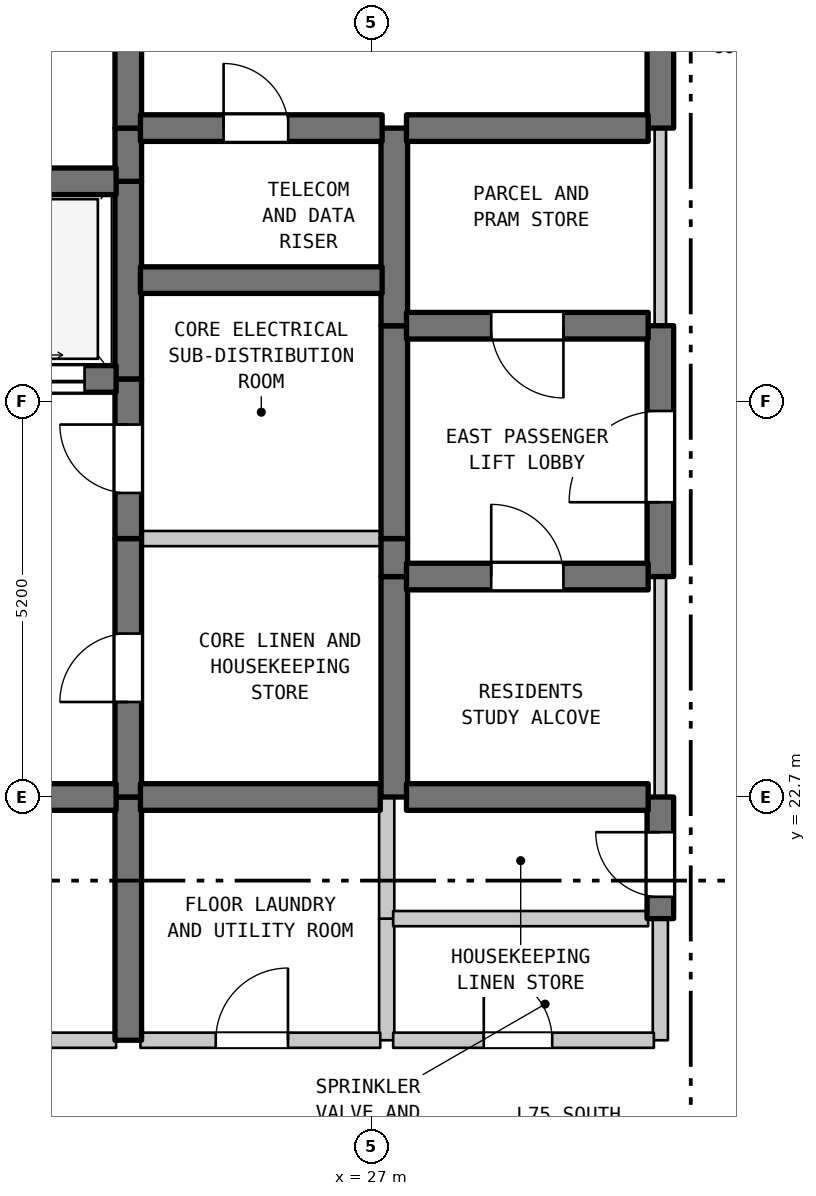
"""IFC4 building model, lengths in metres.
Left out: names, types, materials, properties, quantities, classifications, styles, units other than length and angle.
Written with IfcOpenShell. Run it as: python <this file> out.ifc"""

import sys

from ifc_helpers import new_model, si_unit, direction, frame, frame_2d, origin, place, context, subcontext, project, spatial, rectangle, extrude, element, fill, save


model = new_model("IFC4")
c1 = context("Model", 3, precision=1e-05, world=origin(), true_north=direction((0.0, 1.0)))
c2 = subcontext(c1, "Body", "Model", "MODEL_VIEW")
j1 = project(units=[si_unit("LENGTHUNIT", "METRE"), si_unit("PLANEANGLEUNIT", "RADIAN")], contexts=[c1])
p1 = place(None, origin())
s1 = spatial("IfcSite", under=j1, at=p1, CompositionType="ELEMENT")
p2 = place(p1, origin())
s2 = spatial("IfcBuilding", under=s1, at=p2, CompositionType="ELEMENT")
p3 = place(p2, frame((0.0, 0.0, 299.1)))
s3 = spatial("IfcBuildingStorey", under=s2, at=p3, CompositionType="ELEMENT", Elevation=299.1)
p4 = place(p3, frame((23.8, 19.5, 0.0), z_axis=(0.0, 0.0, 1.0), x_axis=(0.0, 1.0, 0.0)))
e1 = element("IfcWall", 1, at=p4, inside=s3, PredefinedType="SHEAR", context=c2, shape_type="SweptSolid", body=[
    extrude(rectangle(XDim=3.2, YDim=0.35, at=frame_2d((1.6, 0.0))), origin(), (0.0, 0.0, 1.0), 4.19),
])
p5 = place(p3, frame((23.8, 22.7, 0.0), z_axis=(0.0, 0.0, 1.0), x_axis=(0.0, 1.0, 0.0)))
e2 = element("IfcWall", 2, at=p5, inside=s3, PredefinedType="SHEAR", context=c2, shape_type="SweptSolid", body=[
    extrude(rectangle(XDim=3.4, YDim=0.35, at=frame_2d((1.7, 0.0))), origin(), (0.0, 0.0, 1.0), 4.19),
])
p6 = place(p5, frame((1.25, 0.0, 0.0)))
e3 = element("IfcOpeningElement", 3, at=p6, cuts=e2, PredefinedType="OPENING", context=c2, shape_type="SweptSolid", body=[
    extrude(rectangle(XDim=0.9, YDim=2.15, at=frame_2d((0.45, 1.075))), frame((0.0, 0.185, 0.0), z_axis=(0.0, -1.0, 0.0), x_axis=(1.0, 0.0, 0.0)), (0.0, 0.0, 1.0), 0.37),
])
p7 = place(p3, frame((23.8, 26.1, 0.0), z_axis=(0.0, 0.0, 1.0), x_axis=(0.0, 1.0, 0.0)))
e4 = element("IfcWall", 4, at=p7, inside=s3, PredefinedType="SHEAR", context=c2, shape_type="SweptSolid", body=[
    extrude(rectangle(XDim=2.1, YDim=0.35, at=frame_2d((1.05, 0.0))), origin(), (0.0, 0.0, 1.0), 4.19),
])
p8 = place(p7, frame((0.6, 0.0, 0.0)))
e5 = element("IfcOpeningElement", 5, at=p8, cuts=e4, PredefinedType="OPENING", context=c2, shape_type="SweptSolid", body=[
    extrude(rectangle(XDim=0.9, YDim=2.15, at=frame_2d((0.45, 1.075))), frame((0.0, 0.185, 0.0), z_axis=(0.0, -1.0, 0.0), x_axis=(1.0, 0.0, 0.0)), (0.0, 0.0, 1.0), 0.37),
])
p9 = place(p3, frame((23.8, 28.2, 0.0), z_axis=(0.0, 0.0, 1.0), x_axis=(0.0, 1.0, 0.0)))
e6 = element("IfcWall", 6, at=p9, inside=s3, PredefinedType="SHEAR", context=c2, shape_type="SweptSolid", body=[
    extrude(rectangle(XDim=2.6, YDim=0.35, at=frame_2d((1.3, 0.0))), origin(), (0.0, 0.0, 1.0), 4.19),
])
p10 = place(p3, frame((23.8, 30.8, 0.0), z_axis=(0.0, 0.0, 1.0), x_axis=(0.0, 1.0, 0.0)))
e7 = element("IfcWall", 7, at=p10, inside=s3, PredefinedType="SHEAR", context=c2, shape_type="SweptSolid", body=[
    extrude(rectangle(XDim=0.7, YDim=0.35, at=frame_2d((0.35, 0.0))), origin(), (0.0, 0.0, 1.0), 4.19),
])
p11 = place(p3, frame((23.8, 31.5, 0.0), z_axis=(0.0, 0.0, 1.0), x_axis=(0.0, 1.0, 0.0)))
e8 = element("IfcWall", 8, at=p11, inside=s3, PredefinedType="SHEAR", context=c2, shape_type="SweptSolid", body=[
    extrude(rectangle(XDim=3.5, YDim=0.35, at=frame_2d((1.75, 0.0))), origin(), (0.0, 0.0, 1.0), 4.19),
])
p12 = place(p11, frame((1.127, 0.0, 0.0)))
e9 = element("IfcOpeningElement", 9, at=p12, cuts=e8, PredefinedType="OPENING", context=c2, shape_type="SweptSolid", body=[
    extrude(rectangle(XDim=1.1, YDim=2.15, at=frame_2d((0.55, 1.075))), frame((0.0, 0.185, 0.0), z_axis=(0.0, -1.0, 0.0), x_axis=(1.0, 0.0, 0.0)), (0.0, 0.0, 1.0), 0.37),
])
p13 = place(p3, frame((27.2, 19.5, 0.0), z_axis=(0.0, 0.0, 1.0), x_axis=(0.0, 1.0, 0.0)))
e10 = element("IfcWall", 10, at=p13, inside=s3, PredefinedType="STANDARD", context=c2, shape_type="SweptSolid", body=[
    extrude(rectangle(XDim=1.6, YDim=0.2, at=frame_2d((0.8, 0.0))), origin(), (0.0, 0.0, 1.0), 4.19),
])
p14 = place(p3, frame((27.2, 21.1, 0.0), z_axis=(0.0, 0.0, 1.0), x_axis=(0.0, 1.0, 0.0)))
e11 = element("IfcWall", 11, at=p14, inside=s3, PredefinedType="STANDARD", context=c2, shape_type="SweptSolid", body=[
    extrude(rectangle(XDim=1.6, YDim=0.2, at=frame_2d((0.8, 0.0))), origin(), (0.0, 0.0, 1.0), 4.19),
])
p15 = place(p3, frame((27.3, 22.7, 0.0), z_axis=(0.0, 0.0, 1.0), x_axis=(0.0, 1.0, 0.0)))
e12 = element("IfcWall", 12, at=p15, inside=s3, PredefinedType="SHEAR", context=c2, shape_type="SweptSolid", body=[
    extrude(rectangle(XDim=2.9, YDim=0.35, at=frame_2d((1.45, 0.0))), origin(), (0.0, 0.0, 1.0), 4.19),
])
p16 = place(p3, frame((27.3, 25.6, 0.0), z_axis=(0.0, 0.0, 1.0), x_axis=(0.0, 1.0, 0.0)))
e13 = element("IfcWall", 13, at=p16, inside=s3, PredefinedType="SHEAR", context=c2, shape_type="SweptSolid", body=[
    extrude(rectangle(XDim=0.5, YDim=0.35, at=frame_2d((0.25, 0.0))), origin(), (0.0, 0.0, 1.0), 4.19),
])
p17 = place(p3, frame((27.3, 26.1, 0.0), z_axis=(0.0, 0.0, 1.0), x_axis=(0.0, 1.0, 0.0)))
e14 = element("IfcWall", 14, at=p17, inside=s3, PredefinedType="SHEAR", context=c2, shape_type="SweptSolid", body=[
    extrude(rectangle(XDim=2.8, YDim=0.35, at=frame_2d((1.4, 0.0))), origin(), (0.0, 0.0, 1.0), 4.19),
])
p18 = place(p3, frame((27.3, 28.9, 0.0), z_axis=(0.0, 0.0, 1.0), x_axis=(0.0, 1.0, 0.0)))
e15 = element("IfcWall", 15, at=p18, inside=s3, PredefinedType="SHEAR", context=c2, shape_type="SweptSolid", body=[
    extrude(rectangle(XDim=2.6, YDim=0.35, at=frame_2d((1.3, 0.0))), origin(), (0.0, 0.0, 1.0), 4.19),
])
p19 = place(p3, frame((30.8, 19.5, 0.0), z_axis=(0.0, 0.0, 1.0), x_axis=(0.0, 1.0, 0.0)))
e16 = element("IfcWall", 16, at=p19, inside=s3, PredefinedType="STANDARD", context=c2, shape_type="SweptSolid", body=[
    extrude(rectangle(XDim=1.6, YDim=0.2, at=frame_2d((0.8, 0.0))), origin(), (0.0, 0.0, 1.0), 4.19),
])
p20 = place(p3, frame((30.8, 21.1, 0.0), z_axis=(0.0, 0.0, 1.0), x_axis=(0.0, 1.0, 0.0)))
e17 = element("IfcWall", 17, at=p20, inside=s3, PredefinedType="SHEAR", context=c2, shape_type="SweptSolid", body=[
    extrude(rectangle(XDim=1.6, YDim=0.35, at=frame_2d((0.8, 0.0))), origin(), (0.0, 0.0, 1.0), 4.19),
])
p21 = place(p20, frame((0.287, 0.0, 0.0)))
e18 = element("IfcOpeningElement", 18, at=p21, cuts=e17, PredefinedType="OPENING", context=c2, shape_type="SweptSolid", body=[
    extrude(rectangle(XDim=0.85, YDim=2.1, at=frame_2d((0.425, 1.05))), frame((0.0, 0.185, 0.0), z_axis=(0.0, -1.0, 0.0), x_axis=(1.0, 0.0, 0.0)), (0.0, 0.0, 1.0), 0.37),
])
p22 = place(p3, frame((30.8, 22.7, 0.0), z_axis=(0.0, 0.0, 1.0), x_axis=(0.0, 1.0, 0.0)))
e19 = element("IfcWall", 19, at=p22, inside=s3, PredefinedType="STANDARD", context=c2, shape_type="SweptSolid", body=[
    extrude(rectangle(XDim=2.9, YDim=0.15, at=frame_2d((1.45, 0.0))), origin(), (0.0, 0.0, 1.0), 4.19),
])
p23 = place(p3, frame((30.8, 25.6, 0.0), z_axis=(0.0, 0.0, 1.0), x_axis=(0.0, 1.0, 0.0)))
e20 = element("IfcWall", 20, at=p23, inside=s3, PredefinedType="SHEAR", context=c2, shape_type="SweptSolid", body=[
    extrude(rectangle(XDim=3.3, YDim=0.35, at=frame_2d((1.65, 0.0))), origin(), (0.0, 0.0, 1.0), 4.19),
])
p24 = place(p23, frame((0.978, 0.0, 0.0)))
e21 = element("IfcOpeningElement", 21, at=p24, cuts=e20, PredefinedType="OPENING", context=c2, shape_type="SweptSolid", body=[
    extrude(rectangle(XDim=1.2, YDim=2.2, at=frame_2d((0.6, 1.1))), frame((0.0, 0.185, 0.0), z_axis=(0.0, -1.0, 0.0), x_axis=(1.0, 0.0, 0.0)), (0.0, 0.0, 1.0), 0.37),
])
p25 = place(p3, frame((30.8, 28.9, 0.0), z_axis=(0.0, 0.0, 1.0), x_axis=(0.0, 1.0, 0.0)))
e22 = element("IfcWall", 22, at=p25, inside=s3, PredefinedType="STANDARD", context=c2, shape_type="SweptSolid", body=[
    extrude(rectangle(XDim=2.6, YDim=0.15, at=frame_2d((1.3, 0.0))), origin(), (0.0, 0.0, 1.0), 4.19),
])
p26 = place(p3, frame((30.8, 31.5, 0.0), z_axis=(0.0, 0.0, 1.0), x_axis=(0.0, 1.0, 0.0)))
e23 = element("IfcWall", 23, at=p26, inside=s3, PredefinedType="SHEAR", context=c2, shape_type="SweptSolid", body=[
    extrude(rectangle(XDim=3.5, YDim=0.35, at=frame_2d((1.75, 0.0))), origin(), (0.0, 0.0, 1.0), 4.19),
])
p27 = place(p26, frame((1.15, 0.0, 0.0)))
e24 = element("IfcOpeningElement", 24, at=p27, cuts=e23, PredefinedType="OPENING", context=c2, shape_type="SweptSolid", body=[
    extrude(rectangle(XDim=1.2, YDim=2.2, at=frame_2d((0.6, 1.1))), frame((0.0, 0.185, 0.0), z_axis=(0.0, -1.0, 0.0), x_axis=(1.0, 0.0, 0.0)), (0.0, 0.0, 1.0), 0.37),
])
p28 = place(p3, frame((19.16, 19.5, 0.0), z_axis=(0.0, 0.0, 1.0), x_axis=(1.0, 0.0, 0.0)))
e25 = element("IfcWall", 25, at=p28, inside=s3, PredefinedType="STANDARD", context=c2, shape_type="SweptSolid", body=[
    extrude(rectangle(XDim=4.48, YDim=0.2, at=frame_2d((2.24, 0.0))), origin(), (0.0, 0.0, 1.0), 4.19),
])
p29 = place(p28, frame((1.64, 0.0, 0.0)))
e26 = element("IfcOpeningElement", 26, at=p29, cuts=e25, PredefinedType="OPENING", context=c2, shape_type="SweptSolid", body=[
    extrude(rectangle(XDim=1.2, YDim=2.2, at=frame_2d((0.6, 1.1))), frame((0.0, 0.11, 0.0), z_axis=(0.0, -1.0, 0.0), x_axis=(1.0, 0.0, 0.0)), (0.0, 0.0, 1.0), 0.22),
])
p30 = place(p3, frame((23.96, 19.5, 0.0), z_axis=(0.0, 0.0, 1.0), x_axis=(1.0, 0.0, 0.0)))
e27 = element("IfcWall", 27, at=p30, inside=s3, PredefinedType="STANDARD", context=c2, shape_type="SweptSolid", body=[
    extrude(rectangle(XDim=3.155, YDim=0.2, at=frame_2d((1.578, 0.0))), origin(), (0.0, 0.0, 1.0), 4.19),
])
p31 = place(p30, frame((0.991, 0.0, 0.0)))
e28 = element("IfcOpeningElement", 28, at=p31, cuts=e27, PredefinedType="OPENING", context=c2, shape_type="SweptSolid", body=[
    extrude(rectangle(XDim=0.95, YDim=2.15, at=frame_2d((0.475, 1.075))), frame((0.0, 0.11, 0.0), z_axis=(0.0, -1.0, 0.0), x_axis=(1.0, 0.0, 0.0)), (0.0, 0.0, 1.0), 0.22),
])
p32 = place(p3, frame((27.285, 19.5, 0.0), z_axis=(0.0, 0.0, 1.0), x_axis=(1.0, 0.0, 0.0)))
e29 = element("IfcWall", 29, at=p32, inside=s3, PredefinedType="STANDARD", context=c2, shape_type="SweptSolid", body=[
    extrude(rectangle(XDim=3.43, YDim=0.2, at=frame_2d((1.715, 0.0))), origin(), (0.0, 0.0, 1.0), 4.19),
])
p33 = place(p32, frame((1.192, 0.0, 0.0)))
e30 = element("IfcOpeningElement", 30, at=p33, cuts=e29, PredefinedType="OPENING", context=c2, shape_type="SweptSolid", body=[
    extrude(rectangle(XDim=0.9, YDim=2.15, at=frame_2d((0.45, 1.075))), frame((0.0, 0.11, 0.0), z_axis=(0.0, -1.0, 0.0), x_axis=(1.0, 0.0, 0.0)), (0.0, 0.0, 1.0), 0.22),
])
p34 = place(p3, frame((27.285, 21.1, 0.0), z_axis=(0.0, 0.0, 1.0), x_axis=(1.0, 0.0, 0.0)))
e31 = element("IfcWall", 31, at=p34, inside=s3, PredefinedType="STANDARD", context=c2, shape_type="SweptSolid", body=[
    extrude(rectangle(XDim=3.355, YDim=0.2, at=frame_2d((1.677, 0.0))), origin(), (0.0, 0.0, 1.0), 4.19),
])
p35 = place(p3, frame((19.16, 22.7, 0.0), z_axis=(0.0, 0.0, 1.0), x_axis=(1.0, 0.0, 0.0)))
e32 = element("IfcWall", 32, at=p35, inside=s3, PredefinedType="SHEAR", context=c2, shape_type="SweptSolid", body=[
    extrude(rectangle(XDim=4.48, YDim=0.35, at=frame_2d((2.24, 0.0))), origin(), (0.0, 0.0, 1.0), 4.19),
])
p36 = place(p35, frame((1.64, 0.0, 0.0)))
e33 = element("IfcOpeningElement", 33, at=p36, cuts=e32, PredefinedType="OPENING", context=c2, shape_type="SweptSolid", body=[
    extrude(rectangle(XDim=1.2, YDim=2.2, at=frame_2d((0.6, 1.1))), frame((0.0, 0.185, 0.0), z_axis=(0.0, -1.0, 0.0), x_axis=(1.0, 0.0, 0.0)), (0.0, 0.0, 1.0), 0.37),
])
p37 = place(p3, frame((23.96, 22.7, 0.0), z_axis=(0.0, 0.0, 1.0), x_axis=(1.0, 0.0, 0.0)))
e34 = element("IfcWall", 34, at=p37, inside=s3, PredefinedType="SHEAR", context=c2, shape_type="SweptSolid", body=[
    extrude(rectangle(XDim=3.155, YDim=0.35, at=frame_2d((1.578, 0.0))), origin(), (0.0, 0.0, 1.0), 4.19),
])
p38 = place(p3, frame((27.46, 22.7, 0.0), z_axis=(0.0, 0.0, 1.0), x_axis=(1.0, 0.0, 0.0)))
e35 = element("IfcWall", 35, at=p38, inside=s3, PredefinedType="SHEAR", context=c2, shape_type="SweptSolid", body=[
    extrude(rectangle(XDim=3.18, YDim=0.35, at=frame_2d((1.59, 0.0))), origin(), (0.0, 0.0, 1.0), 4.19),
])
p39 = place(p3, frame((27.46, 25.6, 0.0), z_axis=(0.0, 0.0, 1.0), x_axis=(1.0, 0.0, 0.0)))
e36 = element("IfcWall", 36, at=p39, inside=s3, PredefinedType="SHEAR", context=c2, shape_type="SweptSolid", body=[
    extrude(rectangle(XDim=3.18, YDim=0.35, at=frame_2d((1.59, 0.0))), origin(), (0.0, 0.0, 1.0), 4.19),
])
p40 = place(p39, frame((1.115, 0.0, 0.0)))
e37 = element("IfcOpeningElement", 37, at=p40, cuts=e36, PredefinedType="OPENING", context=c2, shape_type="SweptSolid", body=[
    extrude(rectangle(XDim=0.95, YDim=2.15, at=frame_2d((0.475, 1.075))), frame((0.0, 0.185, 0.0), z_axis=(0.0, -1.0, 0.0), x_axis=(1.0, 0.0, 0.0)), (0.0, 0.0, 1.0), 0.37),
])
p41 = place(p3, frame((23.96, 26.1, 0.0), z_axis=(0.0, 0.0, 1.0), x_axis=(1.0, 0.0, 0.0)))
e38 = element("IfcWall", 38, at=p41, inside=s3, PredefinedType="STANDARD", context=c2, shape_type="SweptSolid", body=[
    extrude(rectangle(XDim=3.18, YDim=0.2, at=frame_2d((1.59, 0.0))), origin(), (0.0, 0.0, 1.0), 4.19),
])
p42 = place(p3, frame((19.16, 28.2, 0.0), z_axis=(0.0, 0.0, 1.0), x_axis=(1.0, 0.0, 0.0)))
e39 = element("IfcWall", 39, at=p42, inside=s3, PredefinedType="SHEAR", context=c2, shape_type="SweptSolid", body=[
    extrude(rectangle(XDim=4.48, YDim=0.35, at=frame_2d((2.24, 0.0))), origin(), (0.0, 0.0, 1.0), 4.19),
])
p43 = place(p42, frame((0.415, 0.0, 0.0)))
e40 = element("IfcOpeningElement", 40, at=p43, cuts=e39, PredefinedType="OPENING", context=c2, shape_type="SweptSolid", body=[
    extrude(rectangle(XDim=1.25, YDim=2.2, at=frame_2d((0.625, 1.1))), frame((0.0, 0.185, 0.0), z_axis=(0.0, -1.0, 0.0), x_axis=(1.0, 0.0, 0.0)), (0.0, 0.0, 1.0), 0.37),
])
p44 = place(p42, frame((2.815, 0.0, 0.0)))
e41 = element("IfcOpeningElement", 41, at=p44, cuts=e39, PredefinedType="OPENING", context=c2, shape_type="SweptSolid", body=[
    extrude(rectangle(XDim=1.25, YDim=2.2, at=frame_2d((0.625, 1.1))), frame((0.0, 0.185, 0.0), z_axis=(0.0, -1.0, 0.0), x_axis=(1.0, 0.0, 0.0)), (0.0, 0.0, 1.0), 0.37),
])
p45 = place(p3, frame((27.46, 28.9, 0.0), z_axis=(0.0, 0.0, 1.0), x_axis=(1.0, 0.0, 0.0)))
e42 = element("IfcWall", 42, at=p45, inside=s3, PredefinedType="SHEAR", context=c2, shape_type="SweptSolid", body=[
    extrude(rectangle(XDim=3.18, YDim=0.35, at=frame_2d((1.59, 0.0))), origin(), (0.0, 0.0, 1.0), 4.19),
])
p46 = place(p45, frame((1.115, 0.0, 0.0)))
e43 = element("IfcOpeningElement", 43, at=p46, cuts=e42, PredefinedType="OPENING", context=c2, shape_type="SweptSolid", body=[
    extrude(rectangle(XDim=0.95, YDim=2.15, at=frame_2d((0.475, 1.075))), frame((0.0, 0.185, 0.0), z_axis=(0.0, -1.0, 0.0), x_axis=(1.0, 0.0, 0.0)), (0.0, 0.0, 1.0), 0.37),
])
p47 = place(p3, frame((23.96, 29.5, 0.0), z_axis=(0.0, 0.0, 1.0), x_axis=(1.0, 0.0, 0.0)))
e44 = element("IfcWall", 44, at=p47, inside=s3, PredefinedType="SHEAR", context=c2, shape_type="SweptSolid", body=[
    extrude(rectangle(XDim=3.18, YDim=0.35, at=frame_2d((1.59, 0.0))), origin(), (0.0, 0.0, 1.0), 4.19),
])
p48 = place(p3, frame((19.16, 30.8, 0.0), z_axis=(0.0, 0.0, 1.0), x_axis=(1.0, 0.0, 0.0)))
e45 = element("IfcWall", 45, at=p48, inside=s3, PredefinedType="SHEAR", context=c2, shape_type="SweptSolid", body=[
    extrude(rectangle(XDim=4.48, YDim=0.35, at=frame_2d((2.24, 0.0))), origin(), (0.0, 0.0, 1.0), 4.19),
])
p49 = place(p3, frame((23.96, 31.5, 0.0), z_axis=(0.0, 0.0, 1.0), x_axis=(1.0, 0.0, 0.0)))
e46 = element("IfcWall", 46, at=p49, inside=s3, PredefinedType="SHEAR", context=c2, shape_type="SweptSolid", body=[
    extrude(rectangle(XDim=3.18, YDim=0.35, at=frame_2d((1.59, 0.0))), origin(), (0.0, 0.0, 1.0), 4.19),
])
p50 = place(p49, frame((1.094, 0.0, 0.0)))
e47 = element("IfcOpeningElement", 47, at=p50, cuts=e46, PredefinedType="OPENING", context=c2, shape_type="SweptSolid", body=[
    extrude(rectangle(XDim=0.85, YDim=2.1, at=frame_2d((0.425, 1.05))), frame((0.0, 0.185, 0.0), z_axis=(0.0, -1.0, 0.0), x_axis=(1.0, 0.0, 0.0)), (0.0, 0.0, 1.0), 0.37),
])
p51 = place(p3, frame((27.46, 31.5, 0.0), z_axis=(0.0, 0.0, 1.0), x_axis=(1.0, 0.0, 0.0)))
e48 = element("IfcWall", 48, at=p51, inside=s3, PredefinedType="SHEAR", context=c2, shape_type="SweptSolid", body=[
    extrude(rectangle(XDim=3.18, YDim=0.35, at=frame_2d((1.59, 0.0))), origin(), (0.0, 0.0, 1.0), 4.19),
])
p52 = place(p6, origin())
e49 = element("IfcDoor", 49, at=p52, inside=s3, OperationType="SINGLE_SWING_LEFT", PredefinedType="DOOR", context=c2, shape_type="SweptSolid", body=[
    extrude(rectangle(XDim=0.9, YDim=2.15, at=frame_2d((0.45, 1.075))), frame((0.0, 0.025, 0.0), z_axis=(0.0, -1.0, 0.0), x_axis=(1.0, 0.0, 0.0)), (0.0, 0.0, 1.0), 0.05),
])
fill(e3, e49)
p53 = place(p8, origin())
e50 = element("IfcDoor", 50, at=p53, inside=s3, OperationType="SINGLE_SWING_RIGHT", PredefinedType="DOOR", context=c2, shape_type="SweptSolid", body=[
    extrude(rectangle(XDim=0.9, YDim=2.15, at=frame_2d((0.45, 1.075))), frame((0.0, 0.025, 0.0), z_axis=(0.0, -1.0, 0.0), x_axis=(1.0, 0.0, 0.0)), (0.0, 0.0, 1.0), 0.05),
])
fill(e5, e50)
p54 = place(p21, origin())
e51 = element("IfcDoor", 51, at=p54, inside=s3, OperationType="SINGLE_SWING_RIGHT", PredefinedType="DOOR", context=c2, shape_type="SweptSolid", body=[
    extrude(rectangle(XDim=0.85, YDim=2.1, at=frame_2d((0.425, 1.05))), frame((0.0, 0.025, 0.0), z_axis=(0.0, -1.0, 0.0), x_axis=(1.0, 0.0, 0.0)), (0.0, 0.0, 1.0), 0.05),
])
fill(e18, e51)
p55 = place(p24, origin())
e52 = element("IfcDoor", 52, at=p55, inside=s3, OperationType="SINGLE_SWING_LEFT", PredefinedType="DOOR", context=c2, shape_type="SweptSolid", body=[
    extrude(rectangle(XDim=1.2, YDim=2.2, at=frame_2d((0.6, 1.1))), frame((0.0, 0.025, 0.0), z_axis=(0.0, -1.0, 0.0), x_axis=(1.0, 0.0, 0.0)), (0.0, 0.0, 1.0), 0.05),
])
fill(e21, e52)
p56 = place(p31, origin())
e53 = element("IfcDoor", 53, at=p56, inside=s3, OperationType="SINGLE_SWING_RIGHT", PredefinedType="DOOR", context=c2, shape_type="SweptSolid", body=[
    extrude(rectangle(XDim=0.95, YDim=2.15, at=frame_2d((0.475, 1.075))), frame((0.0, 0.025, 0.0), z_axis=(0.0, -1.0, 0.0), x_axis=(1.0, 0.0, 0.0)), (0.0, 0.0, 1.0), 0.05),
])
fill(e28, e53)
p57 = place(p33, origin())
e54 = element("IfcDoor", 54, at=p57, inside=s3, OperationType="SINGLE_SWING_LEFT", PredefinedType="DOOR", context=c2, shape_type="SweptSolid", body=[
    extrude(rectangle(XDim=0.9, YDim=2.15, at=frame_2d((0.45, 1.075))), frame((0.0, 0.025, 0.0), z_axis=(0.0, -1.0, 0.0), x_axis=(1.0, 0.0, 0.0)), (0.0, 0.0, 1.0), 0.05),
])
fill(e30, e54)
p58 = place(p40, origin())
e55 = element("IfcDoor", 55, at=p58, inside=s3, OperationType="SINGLE_SWING_LEFT", PredefinedType="DOOR", context=c2, shape_type="SweptSolid", body=[
    extrude(rectangle(XDim=0.95, YDim=2.15, at=frame_2d((0.475, 1.075))), frame((0.0, 0.025, 0.0), z_axis=(0.0, -1.0, 0.0), x_axis=(1.0, 0.0, 0.0)), (0.0, 0.0, 1.0), 0.05),
])
fill(e37, e55)
p59 = place(p44, origin())
e56 = element("IfcDoor", 56, at=p59, inside=s3, OperationType="DOUBLE_DOOR_SLIDING", PredefinedType="DOOR", context=c2, shape_type="SweptSolid", body=[
    extrude(rectangle(XDim=1.25, YDim=2.2, at=frame_2d((0.625, 1.1))), frame((0.0, 0.025, 0.0), z_axis=(0.0, -1.0, 0.0), x_axis=(1.0, 0.0, 0.0)), (0.0, 0.0, 1.0), 0.05),
])
fill(e41, e56)
p60 = place(p46, frame((0.95, 0.0, 0.0), z_axis=(0.0, 0.0, 1.0), x_axis=(-1.0, 0.0, 0.0)))
e57 = element("IfcDoor", 57, at=p60, inside=s3, OperationType="SINGLE_SWING_RIGHT", PredefinedType="DOOR", context=c2, shape_type="SweptSolid", body=[
    extrude(rectangle(XDim=0.95, YDim=2.15, at=frame_2d((0.475, 1.075))), frame((0.0, 0.025, 0.0), z_axis=(0.0, -1.0, 0.0), x_axis=(1.0, 0.0, 0.0)), (0.0, 0.0, 1.0), 0.05),
])
fill(e43, e57)
p61 = place(p50, origin())
e58 = element("IfcDoor", 58, at=p61, inside=s3, OperationType="SINGLE_SWING_LEFT", PredefinedType="DOOR", context=c2, shape_type="SweptSolid", body=[
    extrude(rectangle(XDim=0.85, YDim=2.1, at=frame_2d((0.425, 1.05))), frame((0.0, 0.025, 0.0), z_axis=(0.0, -1.0, 0.0), x_axis=(1.0, 0.0, 0.0)), (0.0, 0.0, 1.0), 0.05),
])
fill(e47, e58)
save(model, sys.argv[1])
